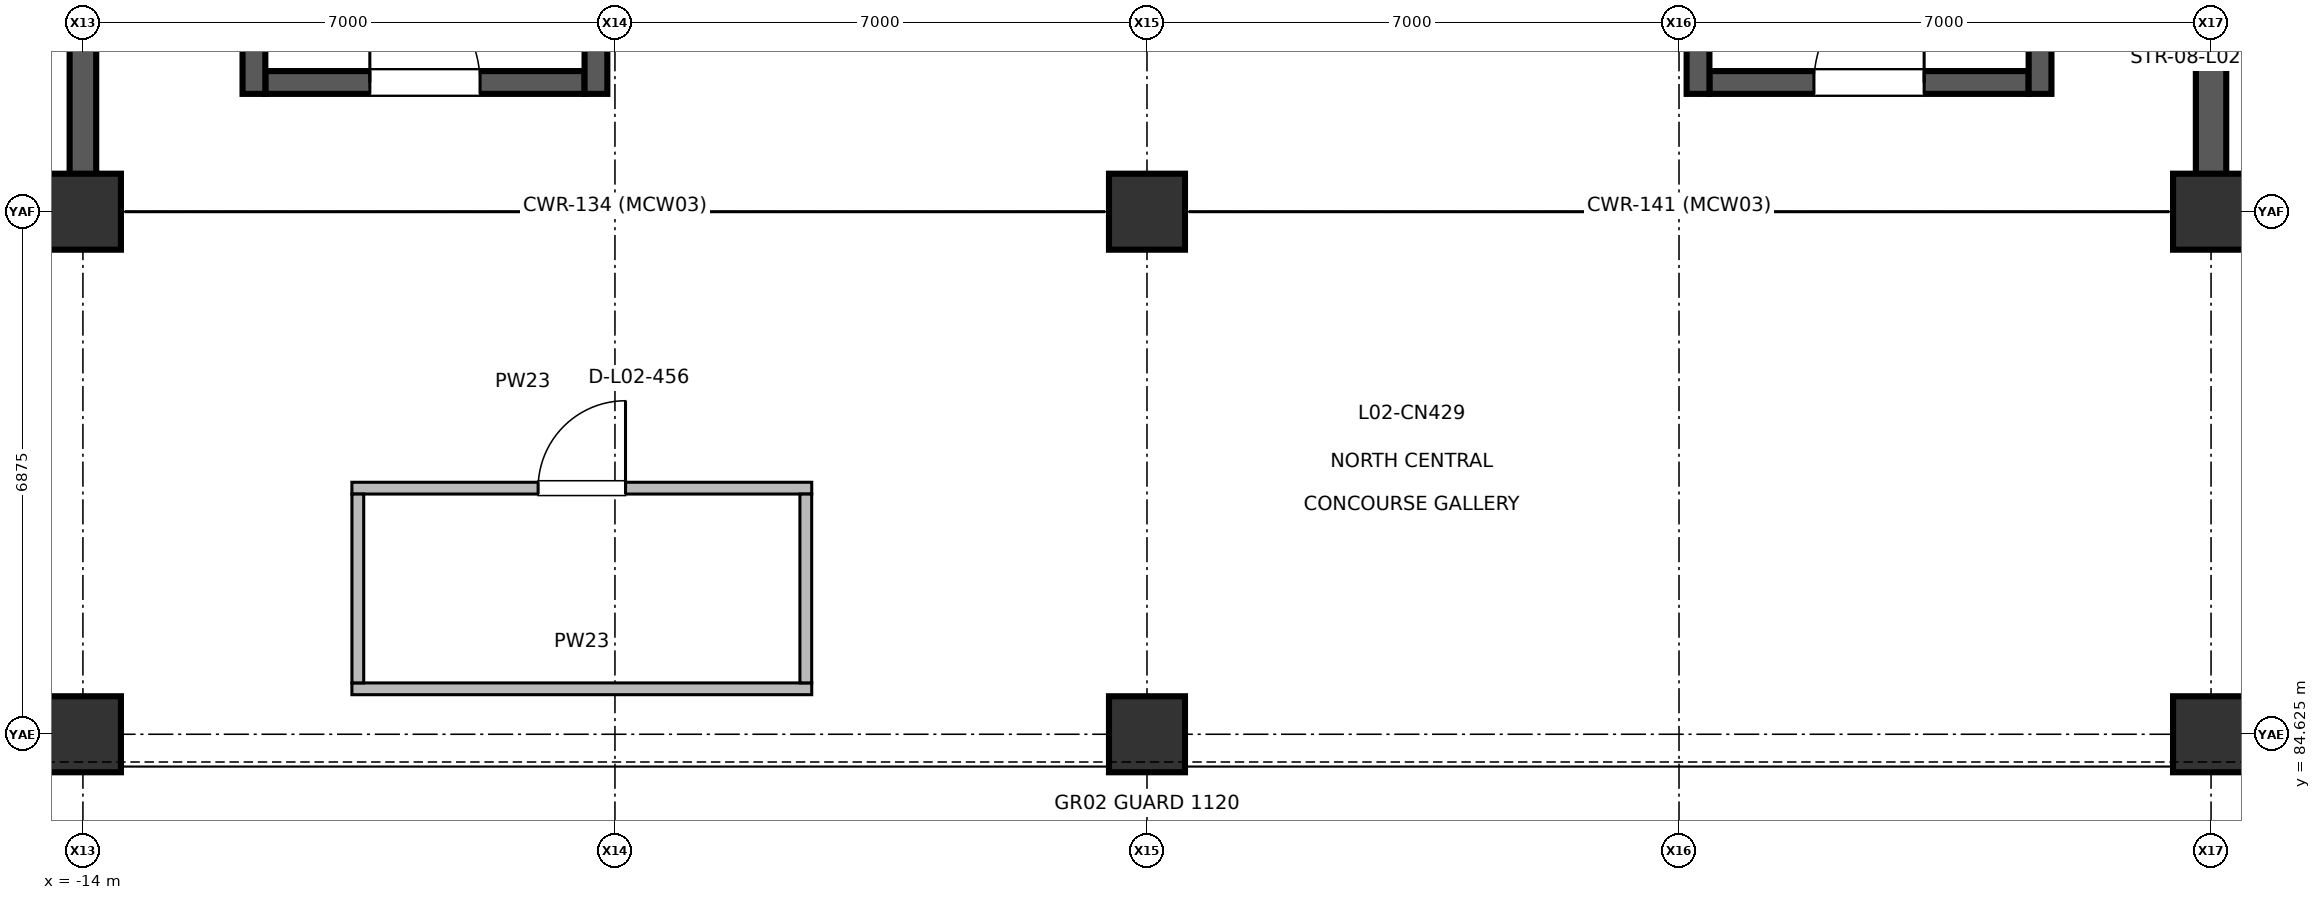
"""IFC4 building model, lengths in metres.
Left out: names, types, materials, properties, quantities, classifications, styles, units other than length and angle.
Written with IfcOpenShell. Run it as: python <this file> out.ifc"""

import sys

from ifc_helpers import new_model, si_unit, direction, frame, frame_2d, origin, origin_2d, place, context, subcontext, project, spatial, rectangle, circle, extrude, element, fill, save


model = new_model("IFC4")
c1 = context("Model", 3, precision=1e-05, world=origin(), true_north=direction((0.0, 1.0)))
c2 = subcontext(c1, "Body", "Model", "MODEL_VIEW")
j1 = project(units=[si_unit("LENGTHUNIT", "METRE"), si_unit("PLANEANGLEUNIT", "RADIAN")], contexts=[c1])
p1 = place(None, origin())
s1 = spatial("IfcSite", under=j1, at=p1, CompositionType="ELEMENT")
p2 = place(p1, origin())
s2 = spatial("IfcBuilding", under=s1, at=p2, CompositionType="ELEMENT")
p3 = place(p2, frame((0.0, 0.0, 6.0)))
s3 = spatial("IfcBuildingStorey", under=s2, at=p3, CompositionType="ELEMENT", Elevation=6.0)
p4 = place(p3, frame((-14.0, 84.625, 0.0), z_axis=(0.0, 0.0, 1.0), x_axis=(1.0, 0.0, 0.0)))
e1 = element("IfcColumn", 1, at=p4, inside=s3, PredefinedType="COLUMN", context=c2, shape_type="SweptSolid", body=[
    extrude(rectangle(XDim=1.0, YDim=1.0, at=origin_2d()), origin(), (0.0, 0.0, 1.0), 5.398),
])
p5 = place(p3, frame((-14.0, 91.5, 0.0), z_axis=(0.0, 0.0, 1.0), x_axis=(1.0, 0.0, 0.0)))
e2 = element("IfcColumn", 2, at=p5, inside=s3, PredefinedType="COLUMN", context=c2, shape_type="SweptSolid", body=[
    extrude(circle(Radius=0.5, at=origin_2d()), origin(), (0.0, 0.0, 1.0), 5.398),
])
p6 = place(p3, frame((0.0, 84.625, 0.0), z_axis=(0.0, 0.0, 1.0), x_axis=(1.0, 0.0, 0.0)))
e3 = element("IfcColumn", 3, at=p6, inside=s3, PredefinedType="COLUMN", context=c2, shape_type="SweptSolid", body=[
    extrude(rectangle(XDim=1.0, YDim=1.0, at=origin_2d()), origin(), (0.0, 0.0, 1.0), 5.398),
])
p7 = place(p3, frame((0.0, 91.5, 0.0), z_axis=(0.0, 0.0, 1.0), x_axis=(1.0, 0.0, 0.0)))
e4 = element("IfcColumn", 4, at=p7, inside=s3, PredefinedType="COLUMN", context=c2, shape_type="SweptSolid", body=[
    extrude(circle(Radius=0.5, at=origin_2d()), origin(), (0.0, 0.0, 1.0), 5.398),
])
p8 = place(p3, frame((14.0, 84.625, 0.0), z_axis=(0.0, 0.0, 1.0), x_axis=(1.0, 0.0, 0.0)))
e5 = element("IfcColumn", 5, at=p8, inside=s3, PredefinedType="COLUMN", context=c2, shape_type="SweptSolid", body=[
    extrude(rectangle(XDim=1.0, YDim=1.0, at=origin_2d()), origin(), (0.0, 0.0, 1.0), 5.398),
])
p9 = place(p3, frame((14.0, 91.5, 0.0), z_axis=(0.0, 0.0, 1.0), x_axis=(1.0, 0.0, 0.0)))
e6 = element("IfcColumn", 6, at=p9, inside=s3, PredefinedType="COLUMN", context=c2, shape_type="SweptSolid", body=[
    extrude(circle(Radius=0.5, at=origin_2d()), origin(), (0.0, 0.0, 1.0), 5.398),
])
p10 = place(p3, frame((-14.0, 91.675, 0.0), z_axis=(0.0, 0.0, 1.0), x_axis=(0.0, 1.0, 0.0)))
e7 = element("IfcWall", 7, at=p10, inside=s3, PredefinedType="SHEAR", context=c2, shape_type="SweptSolid", body=[
    extrude(rectangle(XDim=13.4, YDim=0.35, at=frame_2d((6.7, 0.0))), origin(), (0.0, 0.0, 1.0), 5.2),
])
p11 = place(p3, frame((-27.825, 91.5, 0.0), z_axis=(0.0, 0.0, 1.0), x_axis=(1.0, 0.0, 0.0)))
e8 = element("IfcWall", 8, at=p11, inside=s3, PredefinedType="SHEAR", context=c2, shape_type="SweptSolid", body=[
    extrude(rectangle(XDim=13.65, YDim=0.35, at=frame_2d((6.825, 0.0))), origin(), (0.0, 0.0, 1.0), 5.2),
])
p12 = place(p11, frame((7.507, 0.0, 0.0)))
e9 = element("IfcOpeningElement", 9, at=p12, cuts=e8, PredefinedType="OPENING", context=c2, shape_type="SweptSolid", body=[
    extrude(rectangle(XDim=1.5, YDim=2.2, at=frame_2d((0.75, 1.1))), frame((0.0, 0.185, 0.0), z_axis=(0.0, -1.0, 0.0), x_axis=(1.0, 0.0, 0.0)), (0.0, 0.0, 1.0), 0.37),
])
p13 = place(p3, frame((14.0, 91.7, 0.0), z_axis=(0.0, 0.0, 1.0), x_axis=(0.0, 1.0, 0.0)))
e10 = element("IfcWall", 10, at=p13, inside=s3, PredefinedType="SHEAR", context=c2, shape_type="SweptSolid", body=[
    extrude(rectangle(XDim=13.35, YDim=0.4, at=frame_2d((6.675, 0.0))), origin(), (0.0, 0.0, 1.0), 5.2),
])
p14 = place(p3, frame((14.2, 91.5, 0.0), z_axis=(0.0, 0.0, 1.0), x_axis=(1.0, 0.0, 0.0)))
e11 = element("IfcWall", 11, at=p14, inside=s3, PredefinedType="SHEAR", context=c2, shape_type="SweptSolid", body=[
    extrude(rectangle(XDim=13.6, YDim=0.4, at=frame_2d((6.8, 0.0))), origin(), (0.0, 0.0, 1.0), 5.2),
])
p15 = place(p14, frame((7.48, 0.0, 0.0)))
e12 = element("IfcOpeningElement", 12, at=p15, cuts=e11, PredefinedType="OPENING", context=c2, shape_type="SweptSolid", body=[
    extrude(rectangle(XDim=1.5, YDim=2.2, at=frame_2d((0.75, 1.1))), frame((0.0, 0.21, 0.0), z_axis=(0.0, -1.0, 0.0), x_axis=(1.0, 0.0, 0.0)), (0.0, 0.0, 1.0), 0.42),
])
p16 = place(p3, frame((-10.461, 87.863, 0.0), z_axis=(0.0, 0.0, 1.0), x_axis=(1.0, 0.0, 0.0)))
e13 = element("IfcWall", 13, at=p16, inside=s3, PredefinedType="PARTITIONING", context=c2, shape_type="SweptSolid", body=[
    extrude(rectangle(XDim=6.05, YDim=0.155, at=frame_2d((3.025, 0.0))), origin(), (0.0, 0.0, 1.0), 4.42),
])
p17 = place(p16, frame((2.45, 0.0, 0.0)))
e14 = element("IfcOpeningElement", 14, at=p17, cuts=e13, PredefinedType="OPENING", context=c2, shape_type="SweptSolid", body=[
    extrude(rectangle(XDim=1.15, YDim=2.2, at=frame_2d((0.575, 1.1))), frame((0.0, 0.087, 0.0), z_axis=(0.0, -1.0, 0.0), x_axis=(1.0, 0.0, 0.0)), (0.0, 0.0, 1.0), 0.175),
])
p18 = place(p3, frame((-10.461, 85.223, 0.0), z_axis=(0.0, 0.0, 1.0), x_axis=(1.0, 0.0, 0.0)))
e15 = element("IfcWall", 15, at=p18, inside=s3, PredefinedType="PARTITIONING", context=c2, shape_type="SweptSolid", body=[
    extrude(rectangle(XDim=6.05, YDim=0.155, at=frame_2d((3.025, 0.0))), origin(), (0.0, 0.0, 1.0), 4.42),
])
for number, where, z_axis, x_axis in (
    (16, (-10.383, 85.301, 0.0), (0.0, 0.0, 1.0), (0.0, 1.0, 0.0)),
    (17, (-4.489, 85.301, 0.0), (0.0, 0.0, 1.0), (0.0, 1.0, 0.0)),
):
    element("IfcWall", number, at=place(p3, frame(where, z_axis=z_axis, x_axis=x_axis)), inside=s3, PredefinedType="PARTITIONING", context=c2, shape_type="SweptSolid", body=[
        extrude(rectangle(XDim=2.484, YDim=0.155, at=frame_2d((1.242, 0.0))), origin(), (0.0, 0.0, 1.0), 4.42),
    ])
p19 = place(p3, frame((-11.6, 93.2, 0.0), z_axis=(0.0, 0.0, 1.0), x_axis=(1.0, 0.0, 0.0)))
e18 = element("IfcWall", 18, at=p19, inside=s3, PredefinedType="SHEAR", context=c2, shape_type="SweptSolid", body=[
    extrude(rectangle(XDim=4.2, YDim=0.3, at=frame_2d((2.1, 0.0))), origin(), (0.0, 0.0, 1.0), 5.2),
])
p20 = place(p19, frame((1.375, 0.0, 0.0)))
e19 = element("IfcOpeningElement", 19, at=p20, cuts=e18, PredefinedType="OPENING", context=c2, shape_type="SweptSolid", body=[
    extrude(rectangle(XDim=1.45, YDim=2.2, at=frame_2d((0.725, 1.1))), frame((0.0, 0.16, 0.0), z_axis=(0.0, -1.0, 0.0), x_axis=(1.0, 0.0, 0.0)), (0.0, 0.0, 1.0), 0.32),
])
for number, where, z_axis, x_axis in (
    (20, (-11.75, 93.05, 0.0), (0.0, 0.0, 1.0), (0.0, 1.0, 0.0)),
    (21, (-7.25, 93.05, 0.0), (0.0, 0.0, 1.0), (0.0, 1.0, 0.0)),
):
    element("IfcWall", number, at=place(p3, frame(where, z_axis=z_axis, x_axis=x_axis)), inside=s3, PredefinedType="SHEAR", context=c2, shape_type="SweptSolid", body=[
        extrude(rectangle(XDim=8.45, YDim=0.3, at=frame_2d((4.225, 0.0))), origin(), (0.0, 0.0, 1.0), 5.2),
    ])
p21 = place(p3, frame((7.4, 93.2, 0.0), z_axis=(0.0, 0.0, 1.0), x_axis=(1.0, 0.0, 0.0)))
e22 = element("IfcWall", 22, at=p21, inside=s3, PredefinedType="SHEAR", context=c2, shape_type="SweptSolid", body=[
    extrude(rectangle(XDim=4.2, YDim=0.3, at=frame_2d((2.1, 0.0))), origin(), (0.0, 0.0, 1.0), 5.2),
])
p22 = place(p21, frame((1.375, 0.0, 0.0)))
e23 = element("IfcOpeningElement", 23, at=p22, cuts=e22, PredefinedType="OPENING", context=c2, shape_type="SweptSolid", body=[
    extrude(rectangle(XDim=1.45, YDim=2.2, at=frame_2d((0.725, 1.1))), frame((0.0, 0.16, 0.0), z_axis=(0.0, -1.0, 0.0), x_axis=(1.0, 0.0, 0.0)), (0.0, 0.0, 1.0), 0.32),
])
for number, where, z_axis, x_axis in (
    (24, (7.25, 93.05, 0.0), (0.0, 0.0, 1.0), (0.0, 1.0, 0.0)),
    (25, (11.75, 93.05, 0.0), (0.0, 0.0, 1.0), (0.0, 1.0, 0.0)),
):
    element("IfcWall", number, at=place(p3, frame(where, z_axis=z_axis, x_axis=x_axis)), inside=s3, PredefinedType="SHEAR", context=c2, shape_type="SweptSolid", body=[
        extrude(rectangle(XDim=8.45, YDim=0.3, at=frame_2d((4.225, 0.0))), origin(), (0.0, 0.0, 1.0), 5.2),
    ])
p23 = place(p17, origin())
e26 = element("IfcDoor", 26, at=p23, inside=s3, OperationType="SINGLE_SWING_RIGHT", PredefinedType="DOOR", context=c2, shape_type="SweptSolid", body=[
    extrude(rectangle(XDim=1.15, YDim=2.2, at=frame_2d((0.575, 1.1))), frame((0.0, 0.025, 0.0), z_axis=(0.0, -1.0, 0.0), x_axis=(1.0, 0.0, 0.0)), (0.0, 0.0, 1.0), 0.05),
])
fill(e14, e26)
p24 = place(p20, origin())
e27 = element("IfcDoor", 27, at=p24, inside=s3, OperationType="SINGLE_SWING_LEFT", PredefinedType="DOOR", context=c2, shape_type="SweptSolid", body=[
    extrude(rectangle(XDim=1.45, YDim=2.2, at=frame_2d((0.725, 1.1))), frame((0.0, 0.025, 0.0), z_axis=(0.0, -1.0, 0.0), x_axis=(1.0, 0.0, 0.0)), (0.0, 0.0, 1.0), 0.05),
])
fill(e19, e27)
p25 = place(p22, origin())
e28 = element("IfcDoor", 28, at=p25, inside=s3, OperationType="SINGLE_SWING_RIGHT", PredefinedType="DOOR", context=c2, shape_type="SweptSolid", body=[
    extrude(rectangle(XDim=1.45, YDim=2.2, at=frame_2d((0.725, 1.1))), frame((0.0, 0.025, 0.0), z_axis=(0.0, -1.0, 0.0), x_axis=(1.0, 0.0, 0.0)), (0.0, 0.0, 1.0), 0.05),
])
fill(e23, e28)
save(model, sys.argv[1])
